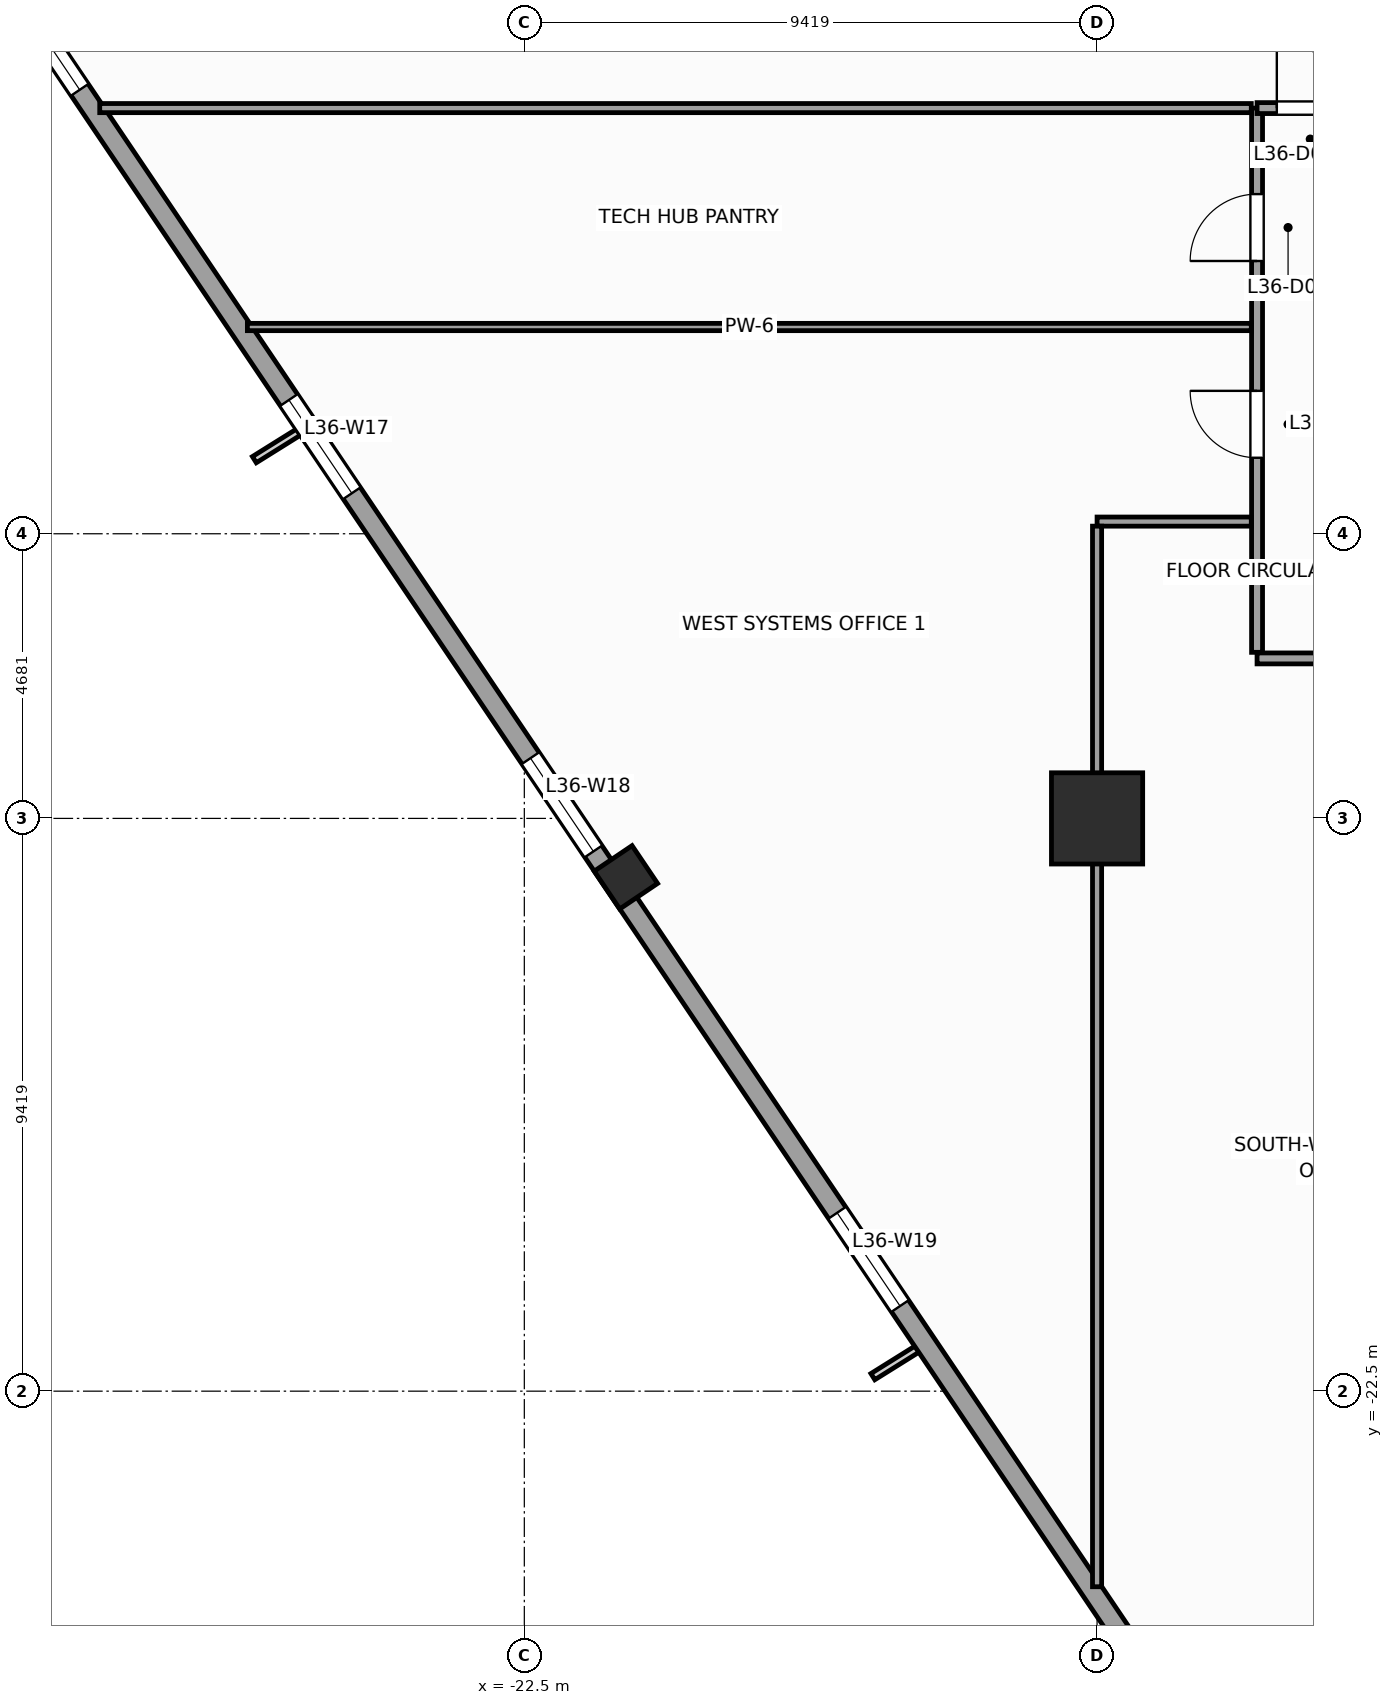
"""IFC4 building model, lengths in metres.
Left out: names, types, materials, properties, quantities, classifications, styles, units other than length and angle.
Written with IfcOpenShell. Run it as: python <this file> out.ifc"""

import sys

from ifc_helpers import new_model, si_unit, direction, frame, frame_2d, origin, origin_2d, place, context, subcontext, project, spatial, rectangle, extrude, source, transform, mapped, element, fill, save


model = new_model("IFC4")
c1 = context("Model", 3, precision=1e-05, world=origin(), true_north=direction((0.0, 1.0)))
c2 = subcontext(c1, "Body", "Model", "MODEL_VIEW")
j1 = project(units=[si_unit("LENGTHUNIT", "METRE"), si_unit("PLANEANGLEUNIT", "RADIAN")], contexts=[c1])
p1 = place(None, origin())
s1 = spatial("IfcSite", under=j1, at=p1, CompositionType="ELEMENT")
p2 = place(p1, origin())
s2 = spatial("IfcBuilding", under=s1, at=p2, CompositionType="ELEMENT")
p3 = place(p2, frame((0.0, 0.0, 152.4)))
s3 = spatial("IfcBuildingStorey", under=s2, at=p3, CompositionType="ELEMENT", Elevation=152.4)
m1 = source(origin(), c2, "Body", "SweptSolid", [
    extrude(rectangle(XDim=1.5, YDim=1.5, at=origin_2d()), origin(), (0.0, 0.0, 1.0), 4.0),
])
p4 = place(p3, frame((-13.081, -13.081, 0.0), z_axis=(0.0, 0.0, 1.0), x_axis=(1.0, 0.0, 0.0)))
e1 = element("IfcColumn", 1, at=p4, inside=s3, PredefinedType="COLUMN", context=c2, shape_type="MappedRepresentation", body=[
    mapped(m1, transform((0.0, 0.0, 0.0), scale=1.0)),
])
m2 = source(origin(), c2, "Body", "SweptSolid", [
    extrude(rectangle(XDim=0.75, YDim=0.75, at=origin_2d()), origin(), (0.0, 0.0, 1.0), 4.0),
])
p5 = place(p3, frame((-20.83, -14.05, 0.0), z_axis=(0.0, 0.0, 1.0), x_axis=(0.829037572555, 0.559192903471, 0.0)))
e2 = element("IfcColumn", 2, at=p5, inside=s3, PredefinedType="COLUMN", context=c2, shape_type="MappedRepresentation", body=[
    mapped(m2, transform((0.0, 0.0, 0.0), scale=1.0)),
])
p6 = place(p3, frame((-32.558, 2.972, 0.0), z_axis=(0.0, 0.0, 1.0), x_axis=(0.559194910251, -0.829036218961, 0.0)))
e3 = element("IfcWall", 3, at=p6, inside=s3, PredefinedType="STANDARD", context=c2, shape_type="SweptSolid", body=[
    extrude(rectangle(XDim=41.34, YDim=0.34, at=frame_2d((20.67, 0.0))), origin(), (0.0, 0.0, 1.0), 3.04),
])
p7 = place(p6, frame((3.511, 0.0, 0.56)))
e4 = element("IfcOpeningElement", 4, at=p7, cuts=e3, PredefinedType="OPENING", context=c2, shape_type="SweptSolid", body=[
    extrude(rectangle(XDim=1.4, YDim=2.4, at=frame_2d((0.7, 1.2))), frame((0.0, 0.18, 0.0), z_axis=(0.0, -1.0, 0.0), x_axis=(1.0, 0.0, 0.0)), (0.0, 0.0, 1.0), 0.36),
])
p8 = place(p6, frame((11.064, 0.0, 0.61)))
e5 = element("IfcOpeningElement", 5, at=p8, cuts=e3, PredefinedType="OPENING", context=c2, shape_type="SweptSolid", body=[
    extrude(rectangle(XDim=1.85, YDim=2.35, at=frame_2d((0.925, 1.175))), frame((0.0, 0.18, 0.0), z_axis=(0.0, -1.0, 0.0), x_axis=(1.0, 0.0, 0.0)), (0.0, 0.0, 1.0), 0.36),
])
p9 = place(p6, frame((18.168, 0.0, 0.61)))
e6 = element("IfcOpeningElement", 6, at=p9, cuts=e3, PredefinedType="OPENING", context=c2, shape_type="SweptSolid", body=[
    extrude(rectangle(XDim=1.85, YDim=2.35, at=frame_2d((0.925, 1.175))), frame((0.0, 0.18, 0.0), z_axis=(0.0, -1.0, 0.0), x_axis=(1.0, 0.0, 0.0)), (0.0, 0.0, 1.0), 0.36),
])
p10 = place(p6, frame((27.186, 0.0, 0.61)))
e7 = element("IfcOpeningElement", 7, at=p10, cuts=e3, PredefinedType="OPENING", context=c2, shape_type="SweptSolid", body=[
    extrude(rectangle(XDim=1.85, YDim=2.35, at=frame_2d((0.925, 1.175))), frame((0.0, 0.18, 0.0), z_axis=(0.0, -1.0, 0.0), x_axis=(1.0, 0.0, 0.0)), (0.0, 0.0, 1.0), 0.36),
])
p11 = place(p6, frame((35.602, 0.0, 0.56)))
e8 = element("IfcOpeningElement", 8, at=p11, cuts=e3, PredefinedType="OPENING", context=c2, shape_type="SweptSolid", body=[
    extrude(rectangle(XDim=1.4, YDim=2.4, at=frame_2d((0.7, 1.2))), frame((0.0, 0.18, 0.0), z_axis=(0.0, -1.0, 0.0), x_axis=(1.0, 0.0, 0.0)), (0.0, 0.0, 1.0), 0.36),
])
p12 = place(p3, frame((-10.45, -10.45, 0.0), z_axis=(0.0, 0.0, 1.0), x_axis=(1.0, 0.0, 0.0)))
e9 = element("IfcWall", 9, at=p12, inside=s3, PredefinedType="PARTITIONING", context=c2, shape_type="SweptSolid", body=[
    extrude(rectangle(XDim=20.9, YDim=0.18, at=frame_2d((10.45, 0.0))), origin(), (0.0, 0.0, 1.0), 3.74),
])
p13 = place(p12, frame((2.339, 0.0, 0.0)))
e10 = element("IfcOpeningElement", 10, at=p13, cuts=e9, PredefinedType="OPENING", context=c2, shape_type="SweptSolid", body=[
    extrude(rectangle(XDim=1.1, YDim=2.2, at=frame_2d((0.55, 1.1))), frame((0.0, 0.1, 0.0), z_axis=(0.0, -1.0, 0.0), x_axis=(1.0, 0.0, 0.0)), (0.0, 0.0, 1.0), 0.2),
])
p14 = place(p12, frame((7.4, 0.0, 0.0)))
e11 = element("IfcOpeningElement", 11, at=p14, cuts=e9, PredefinedType="OPENING", context=c2, shape_type="SweptSolid", body=[
    extrude(rectangle(XDim=1.1, YDim=2.2, at=frame_2d((0.55, 1.1))), frame((0.0, 0.1, 0.0), z_axis=(0.0, -1.0, 0.0), x_axis=(1.0, 0.0, 0.0)), (0.0, 0.0, 1.0), 0.2),
])
p15 = place(p12, frame((12.4, 0.0, 0.0)))
e12 = element("IfcOpeningElement", 12, at=p15, cuts=e9, PredefinedType="OPENING", context=c2, shape_type="SweptSolid", body=[
    extrude(rectangle(XDim=1.1, YDim=2.2, at=frame_2d((0.55, 1.1))), frame((0.0, 0.1, 0.0), z_axis=(0.0, -1.0, 0.0), x_axis=(1.0, 0.0, 0.0)), (0.0, 0.0, 1.0), 0.2),
])
p16 = place(p12, frame((17.46, 0.0, 0.0)))
e13 = element("IfcOpeningElement", 13, at=p16, cuts=e9, PredefinedType="OPENING", context=c2, shape_type="SweptSolid", body=[
    extrude(rectangle(XDim=1.1, YDim=2.2, at=frame_2d((0.55, 1.1))), frame((0.0, 0.1, 0.0), z_axis=(0.0, -1.0, 0.0), x_axis=(1.0, 0.0, 0.0)), (0.0, 0.0, 1.0), 0.2),
])
p17 = place(p3, frame((-10.45, -10.35, 0.0), z_axis=(0.0, 0.0, 1.0), x_axis=(0.0, 1.0, 0.0)))
e14 = element("IfcWall", 14, at=p17, inside=s3, PredefinedType="PARTITIONING", context=c2, shape_type="SweptSolid", body=[
    extrude(rectangle(XDim=8.95, YDim=0.18, at=frame_2d((4.475, 0.0))), origin(), (0.0, 0.0, 1.0), 3.74),
])
p18 = place(p17, frame((6.436, 0.0, 0.0)))
e15 = element("IfcOpeningElement", 15, at=p18, cuts=e14, PredefinedType="OPENING", context=c2, shape_type="SweptSolid", body=[
    extrude(rectangle(XDim=1.1, YDim=2.2, at=frame_2d((0.55, 1.1))), frame((0.0, 0.1, 0.0), z_axis=(0.0, -1.0, 0.0), x_axis=(1.0, 0.0, 0.0)), (0.0, 0.0, 1.0), 0.2),
])
p19 = place(p17, frame((3.2, 0.0, 0.0)))
e16 = element("IfcOpeningElement", 16, at=p19, cuts=e14, PredefinedType="OPENING", context=c2, shape_type="SweptSolid", body=[
    extrude(rectangle(XDim=1.1, YDim=2.2, at=frame_2d((0.55, 1.1))), frame((0.0, 0.1, 0.0), z_axis=(0.0, -1.0, 0.0), x_axis=(1.0, 0.0, 0.0)), (0.0, 0.0, 1.0), 0.2),
])
p20 = place(p3, frame((-10.45, -1.4, 0.0), z_axis=(0.0, 0.0, 1.0), x_axis=(1.0, 0.0, 0.0)))
e17 = element("IfcWall", 17, at=p20, inside=s3, PredefinedType="PARTITIONING", context=c2, shape_type="SweptSolid", body=[
    extrude(rectangle(XDim=1.75, YDim=0.18, at=frame_2d((0.875, 0.0))), origin(), (0.0, 0.0, 1.0), 3.74),
])
p21 = place(p20, frame((0.325, 0.0, 0.0)))
e18 = element("IfcOpeningElement", 18, at=p21, cuts=e17, PredefinedType="OPENING", context=c2, shape_type="SweptSolid", body=[
    extrude(rectangle(XDim=1.1, YDim=2.2, at=frame_2d((0.55, 1.1))), frame((0.0, 0.1, 0.0), z_axis=(0.0, -1.0, 0.0), x_axis=(1.0, 0.0, 0.0)), (0.0, 0.0, 1.0), 0.2),
])
p22 = place(p3, frame((-29.482, -1.4, 0.0), z_axis=(0.0, 0.0, 1.0), x_axis=(1.0, 0.0, 0.0)))
e19 = element("IfcWall", 19, at=p22, inside=s3, PredefinedType="PARTITIONING", context=c2, shape_type="SweptSolid", body=[
    extrude(rectangle(XDim=18.938, YDim=0.15, at=frame_2d((9.469, 0.0))), origin(), (0.0, 0.0, 1.0), 3.74),
])
p23 = place(p3, frame((-10.545, -8.2, 0.0), z_axis=(0.0, 0.0, 1.0), x_axis=(-1.0, 0.0, 0.0)))
e20 = element("IfcWall", 20, at=p23, inside=s3, PredefinedType="PARTITIONING", context=c2, shape_type="SweptSolid", body=[
    extrude(rectangle(XDim=2.536, YDim=0.15, at=frame_2d((1.268, 0.0))), origin(), (0.0, 0.0, 1.0), 3.74),
])
p24 = place(p3, frame((-13.081, -8.275, 0.0), z_axis=(0.0, 0.0, 1.0), x_axis=(0.0, -1.0, 0.0)))
e21 = element("IfcWall", 21, at=p24, inside=s3, PredefinedType="PARTITIONING", context=c2, shape_type="SweptSolid", body=[
    extrude(rectangle(XDim=17.441, YDim=0.15, at=frame_2d((8.721, 0.0))), origin(), (0.0, 0.0, 1.0), 2.84),
])
p25 = place(p3, frame((-27.054, -5.0, 0.0), z_axis=(0.0, 0.0, 1.0), x_axis=(1.0, 0.0, 0.0)))
e22 = element("IfcWall", 22, at=p25, inside=s3, PredefinedType="PARTITIONING", context=c2, shape_type="SweptSolid", body=[
    extrude(rectangle(XDim=16.509, YDim=0.12, at=frame_2d((8.255, 0.0))), origin(), (0.0, 0.0, 1.0), 3.74),
])
m3 = source(origin(), c2, "Body", "SweptSolid", [
    extrude(rectangle(XDim=1.4, YDim=2.4, at=frame_2d((0.7, 1.2))), frame((0.0, 0.03, 0.0), z_axis=(0.0, -1.0, 0.0), x_axis=(1.0, 0.0, 0.0)), (0.0, 0.0, 1.0), 0.06),
])
p26 = place(p7, origin())
e23 = element("IfcWindow", 23, at=p26, inside=s3, PartitioningType="SINGLE_PANEL", PredefinedType="WINDOW", context=c2, shape_type="MappedRepresentation", body=[
    mapped(m3, transform((0.0, 0.0, 0.0), scale=1.0)),
])
fill(e4, e23)
m4 = source(origin(), c2, "Body", "SweptSolid", [
    extrude(rectangle(XDim=1.85, YDim=2.35, at=frame_2d((0.925, 1.175))), frame((0.0, 0.03, 0.0), z_axis=(0.0, -1.0, 0.0), x_axis=(1.0, 0.0, 0.0)), (0.0, 0.0, 1.0), 0.06),
])
p27 = place(p8, origin())
e24 = element("IfcWindow", 24, at=p27, inside=s3, PartitioningType="SINGLE_PANEL", PredefinedType="WINDOW", context=c2, shape_type="MappedRepresentation", body=[
    mapped(m4, transform((0.0, 0.0, 0.0), scale=1.0)),
])
fill(e5, e24)
p28 = place(p9, origin())
e25 = element("IfcWindow", 25, at=p28, inside=s3, PartitioningType="SINGLE_PANEL", PredefinedType="WINDOW", context=c2, shape_type="MappedRepresentation", body=[
    mapped(m4, transform((0.0, 0.0, 0.0), scale=1.0)),
])
fill(e6, e25)
p29 = place(p10, origin())
e26 = element("IfcWindow", 26, at=p29, inside=s3, PartitioningType="SINGLE_PANEL", PredefinedType="WINDOW", context=c2, shape_type="MappedRepresentation", body=[
    mapped(m4, transform((0.0, 0.0, 0.0), scale=1.0)),
])
fill(e7, e26)
m5 = source(origin(), c2, "Body", "SweptSolid", [
    extrude(rectangle(XDim=1.1, YDim=2.2, at=frame_2d((0.55, 1.1))), frame((0.0, 0.025, 0.0), z_axis=(0.0, -1.0, 0.0), x_axis=(1.0, 0.0, 0.0)), (0.0, 0.0, 1.0), 0.05),
])
p30 = place(p21, origin())
e27 = element("IfcDoor", 27, at=p30, inside=s3, OperationType="SINGLE_SWING_LEFT", PredefinedType="DOOR", context=c2, shape_type="MappedRepresentation", body=[
    mapped(m5, transform((0.0, 0.0, 0.0), scale=1.0)),
])
fill(e18, e27)
p31 = place(p18, origin())
e28 = element("IfcDoor", 28, at=p31, inside=s3, OperationType="SINGLE_SWING_LEFT", PredefinedType="DOOR", context=c2, shape_type="MappedRepresentation", body=[
    mapped(m5, transform((0.0, 0.0, 0.0), scale=1.0)),
])
fill(e15, e28)
p32 = place(p19, origin())
e29 = element("IfcDoor", 29, at=p32, inside=s3, OperationType="SINGLE_SWING_RIGHT", PredefinedType="DOOR", context=c2, shape_type="MappedRepresentation", body=[
    mapped(m5, transform((0.0, 0.0, 0.0), scale=1.0)),
])
fill(e16, e29)
save(model, sys.argv[1])
